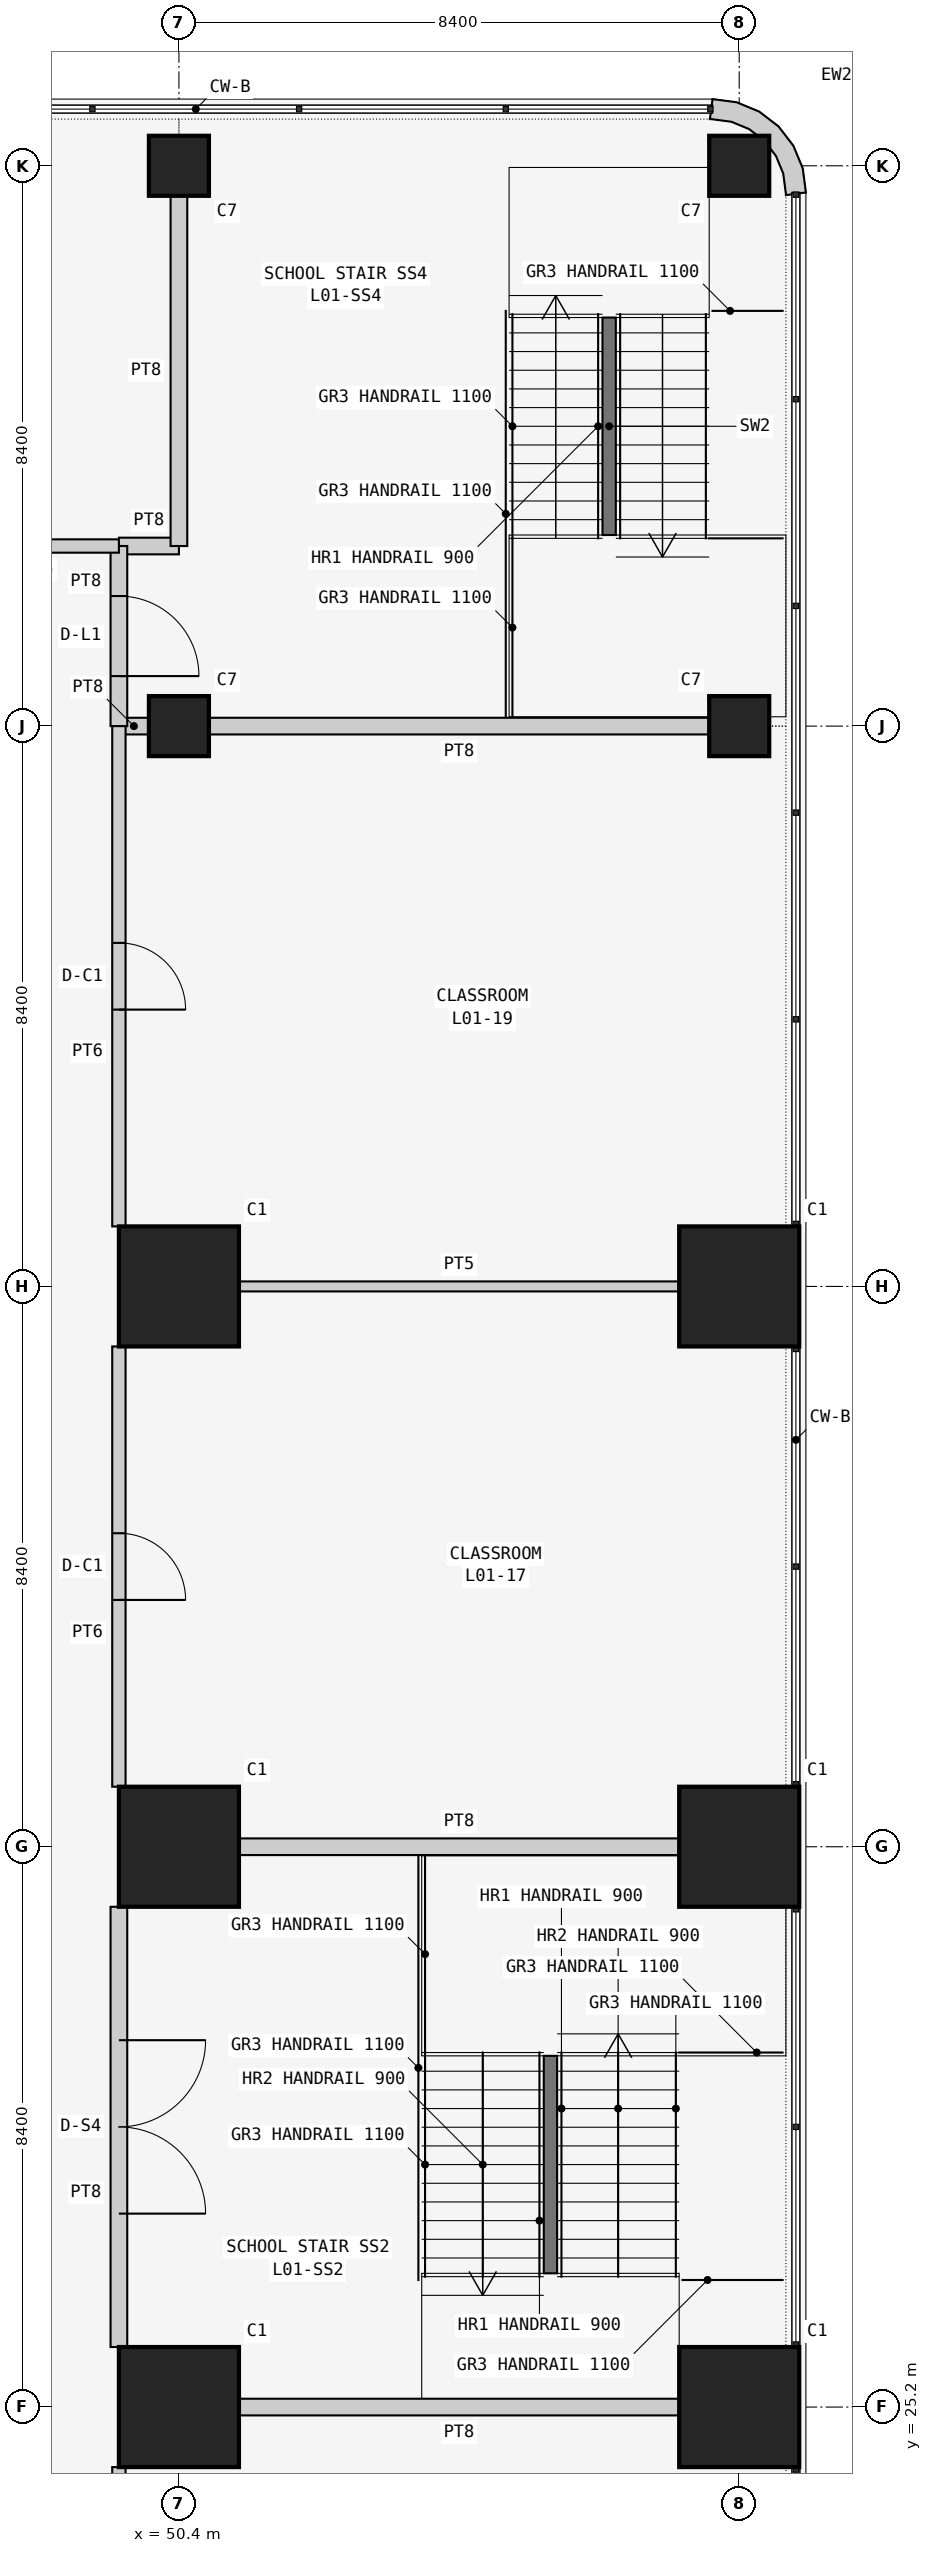
"""IFC4 building model, lengths in metres.
Left out: names, types, materials, properties, quantities, classifications, styles, units other than length and angle.
Written with IfcOpenShell. Run it as: python <this file> out.ifc"""

import sys

from ifc_helpers import new_model, si_unit, direction, frame, frame_2d, origin, origin_2d, place, context, subcontext, project, spatial, polyline, rectangle, outline, extrude, element, fill, save


model = new_model("IFC4")
c1 = context("Model", 3, precision=1e-05, world=origin(), true_north=direction((0.0, 1.0)))
c2 = subcontext(c1, "Body", "Model", "MODEL_VIEW")
j1 = project(units=[si_unit("LENGTHUNIT", "METRE"), si_unit("PLANEANGLEUNIT", "RADIAN")], contexts=[c1])
p1 = place(None, origin())
s1 = spatial("IfcSite", under=j1, at=p1, CompositionType="ELEMENT")
p2 = place(p1, origin())
s2 = spatial("IfcBuilding", under=s1, at=p2, CompositionType="ELEMENT")
p3 = place(p2, frame((0.0, 0.0, 6.0)))
s3 = spatial("IfcBuildingStorey", under=s2, at=p3, CompositionType="ELEMENT", Elevation=6.0)
for number, where, z_axis, x_axis in (
    (1, (50.4, 25.2, 0.0), (0.0, 0.0, 1.0), (1.0, 0.0, 0.0)),
    (2, (50.4, 33.6, 0.0), (0.0, 0.0, 1.0), (1.0, 0.0, 0.0)),
    (3, (50.4, 42.0, 0.0), (0.0, 0.0, 1.0), (1.0, 0.0, 0.0)),
):
    element("IfcColumn", number, at=place(p3, frame(where, z_axis=z_axis, x_axis=x_axis)), inside=s3, PredefinedType="COLUMN", context=c2, shape_type="SweptSolid", body=[
        extrude(rectangle(XDim=1.8, YDim=1.8, at=origin_2d()), origin(), (0.0, 0.0, 1.0), 4.5),
    ])
for number, where, z_axis, x_axis in (
    (4, (50.4, 50.4, 0.0), (0.0, 0.0, 1.0), (1.0, 0.0, 0.0)),
    (5, (50.4, 58.8, 0.0), (0.0, 0.0, 1.0), (1.0, 0.0, 0.0)),
):
    element("IfcColumn", number, at=place(p3, frame(where, z_axis=z_axis, x_axis=x_axis)), inside=s3, PredefinedType="COLUMN", context=c2, shape_type="SweptSolid", body=[
        extrude(rectangle(XDim=0.9, YDim=0.9, at=origin_2d()), origin(), (0.0, 0.0, 1.0), 4.5),
    ])
for number, where, z_axis, x_axis in (
    (6, (58.8, 25.2, 0.0), (0.0, 0.0, 1.0), (1.0, 0.0, 0.0)),
    (7, (58.8, 33.6, 0.0), (0.0, 0.0, 1.0), (1.0, 0.0, 0.0)),
    (8, (58.8, 42.0, 0.0), (0.0, 0.0, 1.0), (1.0, 0.0, 0.0)),
):
    element("IfcColumn", number, at=place(p3, frame(where, z_axis=z_axis, x_axis=x_axis)), inside=s3, PredefinedType="COLUMN", context=c2, shape_type="SweptSolid", body=[
        extrude(rectangle(XDim=1.8, YDim=1.8, at=origin_2d()), origin(), (0.0, 0.0, 1.0), 4.5),
    ])
for number, where, z_axis, x_axis in (
    (9, (58.8, 50.4, 0.0), (0.0, 0.0, 1.0), (1.0, 0.0, 0.0)),
    (10, (58.8, 58.8, 0.0), (0.0, 0.0, 1.0), (1.0, 0.0, 0.0)),
):
    element("IfcColumn", number, at=place(p3, frame(where, z_axis=z_axis, x_axis=x_axis)), inside=s3, PredefinedType="COLUMN", context=c2, shape_type="SweptSolid", body=[
        extrude(rectangle(XDim=0.9, YDim=0.9, at=origin_2d()), origin(), (0.0, 0.0, 1.0), 4.5),
    ])
p4 = place(p3, frame((59.648, 58.355, 0.0), z_axis=(0.0, 0.0, 1.0), x_axis=(0.707106781187, 0.707106781187, 0.0)))
e11 = element("IfcWall", 11, at=p4, inside=s3, PredefinedType="SOLIDWALL", context=c2, shape_type="SweptSolid", body=[
    extrude(outline(polyline([(0.139, 1.904), (-0.101, 1.72), (-0.087, 1.706), (0.1, 1.463), (0.209, 1.198), (0.246, 0.914), (0.209, 0.63), (0.1, 0.365), (-0.087, 0.122), (-0.101, 0.108), (0.139, -0.076), (0.362, 0.214), (0.502, 0.552), (0.549, 0.914), (0.502, 1.276), (0.362, 1.614), (0.139, 1.904)])), origin(), (0.0, 0.0, 1.0), 4.3),
])
for number, where, z_axis, x_axis in (
    (12, (57.9, 25.2, 0.0), (0.0, 0.0, 1.0), (-1.0, 0.0, 0.0)),
    (13, (51.3, 33.6, 0.0), (0.0, 0.0, 1.0), (1.0, 0.0, 0.0)),
):
    element("IfcWall", number, at=place(p3, frame(where, z_axis=z_axis, x_axis=x_axis)), inside=s3, PredefinedType="SOLIDWALL", context=c2, shape_type="SweptSolid", body=[
        extrude(rectangle(XDim=6.6, YDim=0.25, at=frame_2d((3.3, 0.0))), origin(), (0.0, 0.0, 1.0), 3.543),
    ])
p5 = place(p3, frame((49.5, 26.1, 0.0), z_axis=(0.0, 0.0, 1.0), x_axis=(0.0, 1.0, 0.0)))
e14 = element("IfcWall", 14, at=p5, inside=s3, PredefinedType="SOLIDWALL", context=c2, shape_type="SweptSolid", body=[
    extrude(rectangle(XDim=6.6, YDim=0.25, at=frame_2d((3.3, 0.0))), origin(), (0.0, 0.0, 1.0), 4.3),
])
p6 = place(p5, frame((2.0, 0.0, 0.0)))
e15 = element("IfcOpeningElement", 15, at=p6, cuts=e14, PredefinedType="OPENING", context=c2, shape_type="SweptSolid", body=[
    extrude(rectangle(XDim=2.6, YDim=2.4, at=frame_2d((1.3, 1.2))), frame((0.0, 0.135, 0.0), z_axis=(0.0, -1.0, 0.0), x_axis=(1.0, 0.0, 0.0)), (0.0, 0.0, 1.0), 0.27),
])
p7 = place(p3, frame((49.95, 50.4, 0.0), z_axis=(0.0, 0.0, 1.0), x_axis=(-1.0, 0.0, 0.0)))
e16 = element("IfcWall", 16, at=p7, inside=s3, PredefinedType="SOLIDWALL", context=c2, shape_type="SweptSolid", body=[
    extrude(rectangle(XDim=0.45, YDim=0.25, at=frame_2d((0.225, 0.0))), origin(), (0.0, 0.0, 1.0), 3.543),
])
p8 = place(p3, frame((58.35, 50.4, 0.0), z_axis=(0.0, 0.0, 1.0), x_axis=(-1.0, 0.0, 0.0)))
e17 = element("IfcWall", 17, at=p8, inside=s3, PredefinedType="SOLIDWALL", context=c2, shape_type="SweptSolid", body=[
    extrude(rectangle(XDim=7.5, YDim=0.25, at=frame_2d((3.75, 0.0))), origin(), (0.0, 0.0, 1.0), 3.543),
])
p9 = place(p3, frame((49.5, 53.1, 0.0), z_axis=(0.0, 0.0, 1.0), x_axis=(1.0, 0.0, 0.0)))
e18 = element("IfcWall", 18, at=p9, inside=s3, PredefinedType="SOLIDWALL", context=c2, shape_type="SweptSolid", body=[
    extrude(rectangle(XDim=0.9, YDim=0.25, at=frame_2d((0.45, 0.0))), origin(), (0.0, 0.0, 1.0), 4.3),
])
p10 = place(p3, frame((50.4, 53.1, 0.0), z_axis=(0.0, 0.0, 1.0), x_axis=(0.0, 1.0, 0.0)))
e19 = element("IfcWall", 19, at=p10, inside=s3, PredefinedType="SOLIDWALL", context=c2, shape_type="SweptSolid", body=[
    extrude(rectangle(XDim=5.25, YDim=0.25, at=frame_2d((2.625, 0.0))), origin(), (0.0, 0.0, 1.0), 3.543),
])
p11 = place(p3, frame((49.5, 50.4, 0.0), z_axis=(0.0, 0.0, 1.0), x_axis=(0.0, 1.0, 0.0)))
e20 = element("IfcWall", 20, at=p11, inside=s3, PredefinedType="SOLIDWALL", context=c2, shape_type="SweptSolid", body=[
    extrude(rectangle(XDim=2.7, YDim=0.25, at=frame_2d((1.35, 0.0))), origin(), (0.0, 0.0, 1.0), 4.3),
])
p12 = place(p11, frame((0.75, 0.0, 0.0)))
e21 = element("IfcOpeningElement", 21, at=p12, cuts=e20, PredefinedType="OPENING", context=c2, shape_type="SweptSolid", body=[
    extrude(rectangle(XDim=1.2, YDim=2.1, at=frame_2d((0.6, 1.05))), frame((0.0, 0.135, 0.0), z_axis=(0.0, -1.0, 0.0), x_axis=(1.0, 0.0, 0.0)), (0.0, 0.0, 1.0), 0.27),
])
p13 = place(p3, frame((49.5, 17.7, 0.0), z_axis=(0.0, 0.0, 1.0), x_axis=(0.0, 1.0, 0.0)))
e22 = element("IfcWall", 22, at=p13, inside=s3, PredefinedType="PARTITIONING", context=c2, shape_type="SweptSolid", body=[
    extrude(rectangle(XDim=6.6, YDim=0.2, at=frame_2d((3.3, 0.0))), origin(), (0.0, 0.0, 1.0), 4.3),
])
p14 = place(p13, frame((2.8, 0.0, 0.0)))
e23 = element("IfcOpeningElement", 23, at=p14, cuts=e22, PredefinedType="OPENING", context=c2, shape_type="SweptSolid", body=[
    extrude(rectangle(XDim=1.0, YDim=2.1, at=frame_2d((0.5, 1.05))), frame((0.0, 0.11, 0.0), z_axis=(0.0, -1.0, 0.0), x_axis=(1.0, 0.0, 0.0)), (0.0, 0.0, 1.0), 0.22),
])
p15 = place(p3, frame((51.3, 42.0, 0.0), z_axis=(0.0, 0.0, 1.0), x_axis=(1.0, 0.0, 0.0)))
e24 = element("IfcWall", 24, at=p15, inside=s3, PredefinedType="PARTITIONING", context=c2, shape_type="SweptSolid", body=[
    extrude(rectangle(XDim=6.6, YDim=0.15, at=frame_2d((3.3, 0.0))), origin(), (0.0, 0.0, 1.0), 3.543),
])
p16 = place(p3, frame((49.5, 34.5, 0.0), z_axis=(0.0, 0.0, 1.0), x_axis=(0.0, 1.0, 0.0)))
e25 = element("IfcWall", 25, at=p16, inside=s3, PredefinedType="PARTITIONING", context=c2, shape_type="SweptSolid", body=[
    extrude(rectangle(XDim=6.6, YDim=0.2, at=frame_2d((3.3, 0.0))), origin(), (0.0, 0.0, 1.0), 4.3),
])
p17 = place(p16, frame((2.8, 0.0, 0.0)))
e26 = element("IfcOpeningElement", 26, at=p17, cuts=e25, PredefinedType="OPENING", context=c2, shape_type="SweptSolid", body=[
    extrude(rectangle(XDim=1.0, YDim=2.1, at=frame_2d((0.5, 1.05))), frame((0.0, 0.11, 0.0), z_axis=(0.0, -1.0, 0.0), x_axis=(1.0, 0.0, 0.0)), (0.0, 0.0, 1.0), 0.22),
])
p18 = place(p3, frame((49.5, 42.9, 0.0), z_axis=(0.0, 0.0, 1.0), x_axis=(0.0, 1.0, 0.0)))
e27 = element("IfcWall", 27, at=p18, inside=s3, PredefinedType="PARTITIONING", context=c2, shape_type="SweptSolid", body=[
    extrude(rectangle(XDim=7.5, YDim=0.2, at=frame_2d((3.75, 0.0))), origin(), (0.0, 0.0, 1.0), 4.3),
])
p19 = place(p18, frame((3.25, 0.0, 0.0)))
e28 = element("IfcOpeningElement", 28, at=p19, cuts=e27, PredefinedType="OPENING", context=c2, shape_type="SweptSolid", body=[
    extrude(rectangle(XDim=1.0, YDim=2.1, at=frame_2d((0.5, 1.05))), frame((0.0, 0.11, 0.0), z_axis=(0.0, -1.0, 0.0), x_axis=(1.0, 0.0, 0.0)), (0.0, 0.0, 1.0), 0.22),
])
p20 = place(p3, frame((49.5, 53.1, 0.0), z_axis=(0.0, 0.0, 1.0), x_axis=(-1.0, 0.0, 0.0)))
e29 = element("IfcWall", 29, at=p20, inside=s3, PredefinedType="PARTITIONING", context=c2, shape_type="SweptSolid", body=[
    extrude(rectangle(XDim=2.4, YDim=0.2, at=frame_2d((1.2, 0.0))), origin(), (0.0, 0.0, 1.0), 4.3),
])
for number, where, z_axis, x_axis in (
    (30, (55.97, 27.205, 0.0), (0.0, 0.0, 1.0), (0.0, 1.0, 0.0)),
    (31, (56.85, 56.525, 0.0), (0.0, 0.0, 1.0), (0.0, -1.0, 0.0)),
):
    element("IfcWall", number, at=place(p3, frame(where, z_axis=z_axis, x_axis=x_axis)), inside=s3, PredefinedType="SOLIDWALL", context=c2, shape_type="SweptSolid", body=[
        extrude(rectangle(XDim=3.26, YDim=0.2, at=frame_2d((1.63, 0.0))), origin(), (0.0, 0.0, 1.0), 4.5),
    ])
p21 = place(p6, frame((2.6, 0.0, 0.0), z_axis=(0.0, 0.0, 1.0), x_axis=(-1.0, 0.0, 0.0)))
e32 = element("IfcDoor", 32, at=p21, inside=s3, OperationType="DOUBLE_DOOR_SINGLE_SWING", PredefinedType="DOOR", context=c2, shape_type="SweptSolid", body=[
    extrude(rectangle(XDim=2.6, YDim=2.4, at=frame_2d((1.3, 1.2))), frame((0.0, 0.025, 0.0), z_axis=(0.0, -1.0, 0.0), x_axis=(1.0, 0.0, 0.0)), (0.0, 0.0, 1.0), 0.05),
])
fill(e15, e32)
p22 = place(p12, frame((1.2, 0.0, 0.0), z_axis=(0.0, 0.0, 1.0), x_axis=(-1.0, 0.0, 0.0)))
e33 = element("IfcDoor", 33, at=p22, inside=s3, OperationType="SINGLE_SWING_RIGHT", PredefinedType="DOOR", context=c2, shape_type="SweptSolid", body=[
    extrude(rectangle(XDim=1.2, YDim=2.1, at=frame_2d((0.6, 1.05))), frame((0.0, 0.025, 0.0), z_axis=(0.0, -1.0, 0.0), x_axis=(1.0, 0.0, 0.0)), (0.0, 0.0, 1.0), 0.05),
])
fill(e21, e33)
p23 = place(p17, frame((1.0, 0.0, 0.0), z_axis=(0.0, 0.0, 1.0), x_axis=(-1.0, 0.0, 0.0)))
e34 = element("IfcDoor", 34, at=p23, inside=s3, OperationType="SINGLE_SWING_RIGHT", PredefinedType="DOOR", context=c2, shape_type="SweptSolid", body=[
    extrude(rectangle(XDim=1.0, YDim=2.1, at=frame_2d((0.5, 1.05))), frame((0.0, 0.025, 0.0), z_axis=(0.0, -1.0, 0.0), x_axis=(1.0, 0.0, 0.0)), (0.0, 0.0, 1.0), 0.05),
])
fill(e26, e34)
p24 = place(p19, frame((1.0, 0.0, 0.0), z_axis=(0.0, 0.0, 1.0), x_axis=(-1.0, 0.0, 0.0)))
e35 = element("IfcDoor", 35, at=p24, inside=s3, OperationType="SINGLE_SWING_RIGHT", PredefinedType="DOOR", context=c2, shape_type="SweptSolid", body=[
    extrude(rectangle(XDim=1.0, YDim=2.1, at=frame_2d((0.5, 1.05))), frame((0.0, 0.025, 0.0), z_axis=(0.0, -1.0, 0.0), x_axis=(1.0, 0.0, 0.0)), (0.0, 0.0, 1.0), 0.05),
])
fill(e28, e35)
save(model, sys.argv[1])
